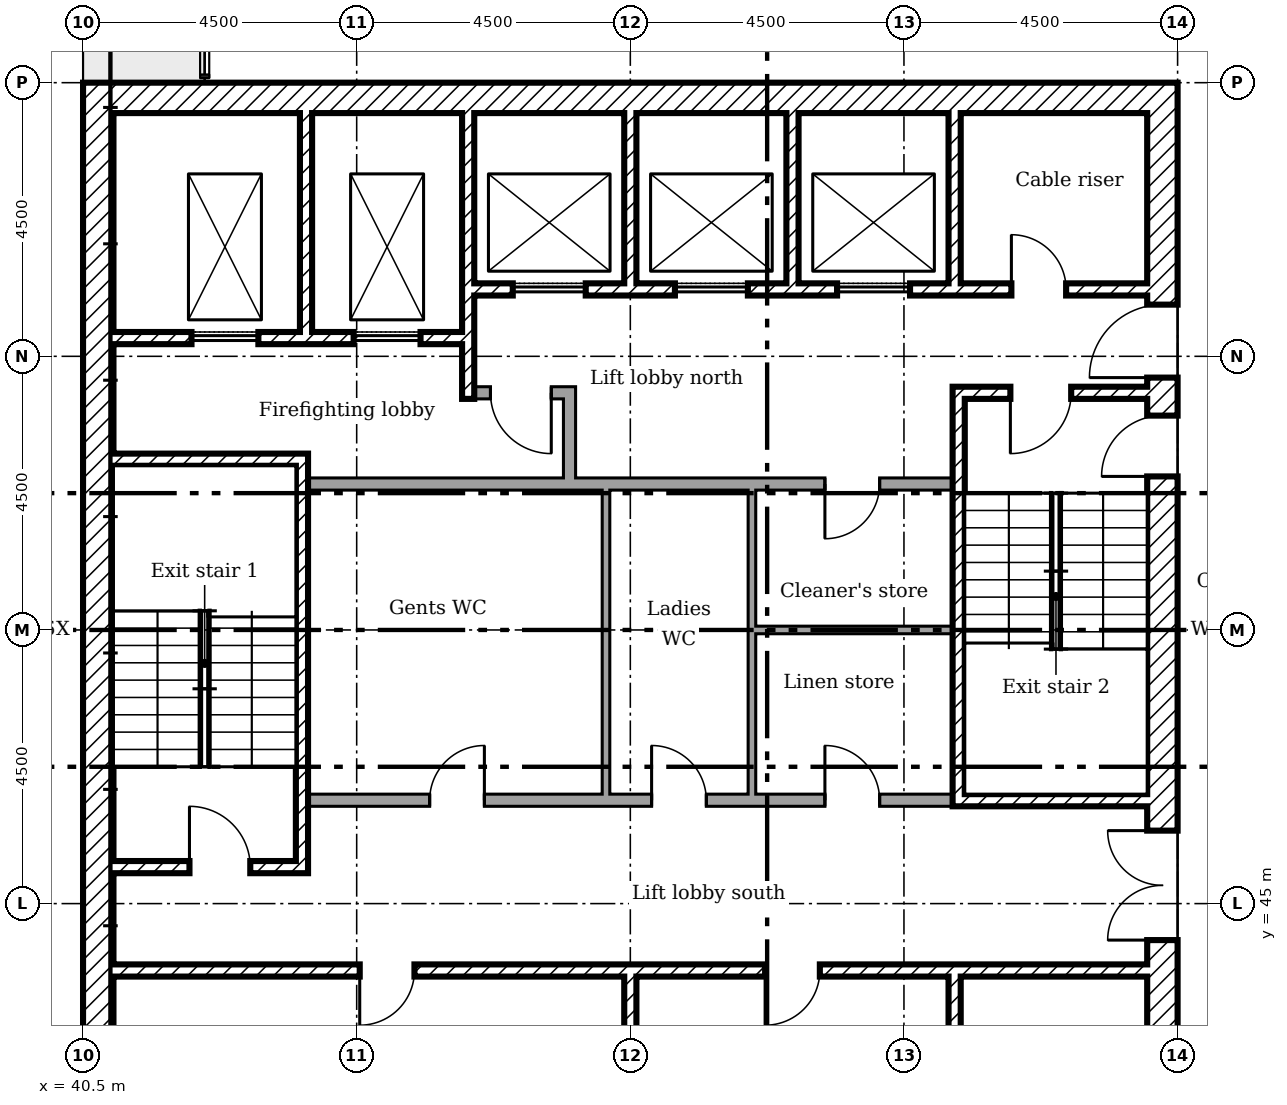
"""IFC4 building model, lengths in metres.
Left out: names, types, materials, properties, quantities, classifications, styles, units other than length and angle.
Written with IfcOpenShell. Run it as: python <this file> out.ifc"""

import sys

from ifc_helpers import new_model, si_unit, direction, frame, frame_2d, origin, place, context, subcontext, project, spatial, rectangle, extrude, element, fill, save


model = new_model("IFC4")
c1 = context("Model", 3, precision=1e-05, world=origin(), true_north=direction((0.0, 1.0)))
c2 = subcontext(c1, "Body", "Model", "MODEL_VIEW")
j1 = project(units=[si_unit("LENGTHUNIT", "METRE"), si_unit("PLANEANGLEUNIT", "RADIAN")], contexts=[c1])
p1 = place(None, origin())
s1 = spatial("IfcSite", under=j1, at=p1, CompositionType="ELEMENT")
p2 = place(p1, origin())
s2 = spatial("IfcBuilding", under=s1, at=p2, CompositionType="ELEMENT")
p3 = place(p2, frame((0.0, 0.0, 199.2)))
s3 = spatial("IfcBuildingStorey", under=s2, at=p3, CompositionType="ELEMENT", Elevation=199.2)
p4 = place(p3, frame((58.25, 40.5, 0.0), z_axis=(0.0, 0.0, 1.0), x_axis=(0.0, 1.0, 0.0)))
e1 = element("IfcWall", 1, at=p4, inside=s3, PredefinedType="SHEAR", context=c2, shape_type="SweptSolid", body=[
    extrude(rectangle(XDim=18.0, YDim=0.5, at=frame_2d((9.0, 0.0))), origin(), (0.0, 0.0, 1.0), 3.35),
])
p5 = place(p4, frame((13.15, 0.0, 0.0)))
e2 = element("IfcOpeningElement", 2, at=p5, cuts=e1, PredefinedType="OPENING", context=c2, shape_type="SweptSolid", body=[
    extrude(rectangle(XDim=1.2, YDim=2.1, at=frame_2d((0.6, 1.05))), frame((0.0, 0.26, 0.0), z_axis=(0.0, -1.0, 0.0), x_axis=(1.0, 0.0, 0.0)), (0.0, 0.0, 1.0), 0.52),
])
p6 = place(p4, frame((3.9, 0.0, 0.0)))
e3 = element("IfcOpeningElement", 3, at=p6, cuts=e1, PredefinedType="OPENING", context=c2, shape_type="SweptSolid", body=[
    extrude(rectangle(XDim=1.8, YDim=2.1, at=frame_2d((0.9, 1.05))), frame((0.0, 0.26, 0.0), z_axis=(0.0, -1.0, 0.0), x_axis=(1.0, 0.0, 0.0)), (0.0, 0.0, 1.0), 0.52),
])
p7 = place(p4, frame((11.525, 0.0, 0.0)))
e4 = element("IfcOpeningElement", 4, at=p7, cuts=e1, PredefinedType="OPENING", context=c2, shape_type="SweptSolid", body=[
    extrude(rectangle(XDim=1.0, YDim=2.1, at=frame_2d((0.5, 1.05))), frame((0.0, 0.26, 0.0), z_axis=(0.0, -1.0, 0.0), x_axis=(1.0, 0.0, 0.0)), (0.0, 0.0, 1.0), 0.52),
])
p8 = place(p3, frame((40.5, 58.25, 0.0)))
e5 = element("IfcWall", 5, at=p8, inside=s3, PredefinedType="SHEAR", context=c2, shape_type="SweptSolid", body=[
    extrude(rectangle(XDim=17.5, YDim=0.5, at=frame_2d((8.75, 0.0))), origin(), (0.0, 0.0, 1.0), 3.35),
])
p9 = place(p3, frame((40.75, 41.0, 0.0), z_axis=(0.0, 0.0, 1.0), x_axis=(0.0, 1.0, 0.0)))
e6 = element("IfcWall", 6, at=p9, inside=s3, PredefinedType="SHEAR", context=c2, shape_type="SweptSolid", body=[
    extrude(rectangle(XDim=17.0, YDim=0.5, at=frame_2d((8.5, 0.0))), origin(), (0.0, 0.0, 1.0), 3.35),
])
p10 = place(p3, frame((44.167, 58.0, 0.0), z_axis=(0.0, 0.0, 1.0), x_axis=(0.0, -1.0, 0.0)))
e7 = element("IfcWall", 7, at=p10, inside=s3, PredefinedType="SHEAR", context=c2, shape_type="SweptSolid", body=[
    extrude(rectangle(XDim=3.6, YDim=0.2, at=frame_2d((1.8, 0.0))), origin(), (0.0, 0.0, 1.0), 3.35),
])
p11 = place(p3, frame((46.833, 58.0, 0.0), z_axis=(0.0, 0.0, 1.0), x_axis=(0.0, -1.0, 0.0)))
e8 = element("IfcWall", 8, at=p11, inside=s3, PredefinedType="SHEAR", context=c2, shape_type="SweptSolid", body=[
    extrude(rectangle(XDim=4.7, YDim=0.2, at=frame_2d((2.35, 0.0))), origin(), (0.0, 0.0, 1.0), 3.35),
])
for number, where, z_axis, x_axis in (
    (9, (49.5, 58.0, 0.0), (0.0, 0.0, 1.0), (0.0, -1.0, 0.0)),
    (10, (52.167, 58.0, 0.0), (0.0, 0.0, 1.0), (0.0, -1.0, 0.0)),
    (11, (54.833, 58.0, 0.0), (0.0, 0.0, 1.0), (0.0, -1.0, 0.0)),
    (12, (49.5, 41.0, 0.0), (0.0, 0.0, 1.0), (0.0, 1.0, 0.0)),
    (13, (54.833, 41.0, 0.0), (0.0, 0.0, 1.0), (0.0, 1.0, 0.0)),
):
    element("IfcWall", number, at=place(p3, frame(where, z_axis=z_axis, x_axis=x_axis)), inside=s3, PredefinedType="SHEAR", context=c2, shape_type="SweptSolid", body=[
        extrude(rectangle(XDim=2.8, YDim=0.2, at=frame_2d((1.4, 0.0))), origin(), (0.0, 0.0, 1.0), 3.35),
    ])
p12 = place(p3, frame((48.5, 51.9, 0.0), z_axis=(0.0, 0.0, 1.0), x_axis=(0.0, 1.0, 0.0)))
e14 = element("IfcWall", 14, at=p12, inside=s3, PredefinedType="PARTITIONING", context=c2, shape_type="SweptSolid", body=[
    extrude(rectangle(XDim=1.6, YDim=0.2, at=frame_2d((0.8, 0.0))), origin(), (0.0, 0.0, 1.0), 3.35),
])
p13 = place(p3, frame((46.933, 53.4, 0.0)))
e15 = element("IfcWall", 15, at=p13, inside=s3, PredefinedType="PARTITIONING", context=c2, shape_type="SweptSolid", body=[
    extrude(rectangle(XDim=1.467, YDim=0.2, at=frame_2d((0.733, 0.0))), origin(), (0.0, 0.0, 1.0), 3.35),
])
p14 = place(p13, frame((0.267, 0.0, 0.0)))
e16 = element("IfcOpeningElement", 16, at=p14, cuts=e15, PredefinedType="OPENING", context=c2, shape_type="SweptSolid", body=[
    extrude(rectangle(XDim=1.0, YDim=2.1, at=frame_2d((0.5, 1.05))), frame((0.0, 0.11, 0.0), z_axis=(0.0, -1.0, 0.0), x_axis=(1.0, 0.0, 0.0)), (0.0, 0.0, 1.0), 0.22),
])
p15 = place(p3, frame((46.933, 55.1, 0.0)))
e17 = element("IfcWall", 17, at=p15, inside=s3, PredefinedType="SHEAR", context=c2, shape_type="SweptSolid", body=[
    extrude(rectangle(XDim=11.067, YDim=0.2, at=frame_2d((5.533, 0.0))), origin(), (0.0, 0.0, 1.0), 3.35),
])
p16 = place(p15, frame((8.833, 0.0, 0.0)))
e18 = element("IfcOpeningElement", 18, at=p16, cuts=e17, PredefinedType="OPENING", context=c2, shape_type="SweptSolid", body=[
    extrude(rectangle(XDim=0.9, YDim=2.1, at=frame_2d((0.45, 1.05))), frame((0.0, 0.11, 0.0), z_axis=(0.0, -1.0, 0.0), x_axis=(1.0, 0.0, 0.0)), (0.0, 0.0, 1.0), 0.22),
])
p17 = place(p15, frame((0.633, 0.0, 0.0)))
e19 = element("IfcOpeningElement", 19, at=p17, cuts=e17, PredefinedType="OPENING", context=c2, shape_type="SweptSolid", body=[
    extrude(rectangle(XDim=1.2, YDim=2.1, at=frame_2d((0.6, 1.05))), frame((0.0, 0.11, 0.0), z_axis=(0.0, -1.0, 0.0), x_axis=(1.0, 0.0, 0.0)), (0.0, 0.0, 1.0), 0.22),
])
p18 = place(p15, frame((3.3, 0.0, 0.0)))
e20 = element("IfcOpeningElement", 20, at=p18, cuts=e17, PredefinedType="OPENING", context=c2, shape_type="SweptSolid", body=[
    extrude(rectangle(XDim=1.2, YDim=2.1, at=frame_2d((0.6, 1.05))), frame((0.0, 0.11, 0.0), z_axis=(0.0, -1.0, 0.0), x_axis=(1.0, 0.0, 0.0)), (0.0, 0.0, 1.0), 0.22),
])
p19 = place(p15, frame((5.967, 0.0, 0.0)))
e21 = element("IfcOpeningElement", 21, at=p19, cuts=e17, PredefinedType="OPENING", context=c2, shape_type="SweptSolid", body=[
    extrude(rectangle(XDim=1.2, YDim=2.1, at=frame_2d((0.6, 1.05))), frame((0.0, 0.11, 0.0), z_axis=(0.0, -1.0, 0.0), x_axis=(1.0, 0.0, 0.0)), (0.0, 0.0, 1.0), 0.22),
])
p20 = place(p3, frame((41.0, 54.3, 0.0)))
e22 = element("IfcWall", 22, at=p20, inside=s3, PredefinedType="SHEAR", context=c2, shape_type="SweptSolid", body=[
    extrude(rectangle(XDim=5.733, YDim=0.2, at=frame_2d((2.867, 0.0))), origin(), (0.0, 0.0, 1.0), 3.35),
])
p21 = place(p20, frame((1.283, 0.0, 0.0)))
e23 = element("IfcOpeningElement", 23, at=p21, cuts=e22, PredefinedType="OPENING", context=c2, shape_type="SweptSolid", body=[
    extrude(rectangle(XDim=1.1, YDim=2.1, at=frame_2d((0.55, 1.05))), frame((0.0, 0.11, 0.0), z_axis=(0.0, -1.0, 0.0), x_axis=(1.0, 0.0, 0.0)), (0.0, 0.0, 1.0), 0.22),
])
p22 = place(p20, frame((3.95, 0.0, 0.0)))
e24 = element("IfcOpeningElement", 24, at=p22, cuts=e22, PredefinedType="OPENING", context=c2, shape_type="SweptSolid", body=[
    extrude(rectangle(XDim=1.1, YDim=2.1, at=frame_2d((0.55, 1.05))), frame((0.0, 0.11, 0.0), z_axis=(0.0, -1.0, 0.0), x_axis=(1.0, 0.0, 0.0)), (0.0, 0.0, 1.0), 0.22),
])
p23 = place(p3, frame((41.0, 43.9, 0.0)))
e25 = element("IfcWall", 25, at=p23, inside=s3, PredefinedType="SHEAR", context=c2, shape_type="SweptSolid", body=[
    extrude(rectangle(XDim=17.0, YDim=0.2, at=frame_2d((8.5, 0.0))), origin(), (0.0, 0.0, 1.0), 3.35),
])
p24 = place(p23, frame((4.05, 0.0, 0.0)))
e26 = element("IfcOpeningElement", 26, at=p24, cuts=e25, PredefinedType="OPENING", context=c2, shape_type="SweptSolid", body=[
    extrude(rectangle(XDim=0.9, YDim=2.1, at=frame_2d((0.45, 1.05))), frame((0.0, 0.11, 0.0), z_axis=(0.0, -1.0, 0.0), x_axis=(1.0, 0.0, 0.0)), (0.0, 0.0, 1.0), 0.22),
])
p25 = place(p23, frame((10.717, 0.0, 0.0)))
e27 = element("IfcOpeningElement", 27, at=p25, cuts=e25, PredefinedType="OPENING", context=c2, shape_type="SweptSolid", body=[
    extrude(rectangle(XDim=0.9, YDim=2.1, at=frame_2d((0.45, 1.05))), frame((0.0, 0.11, 0.0), z_axis=(0.0, -1.0, 0.0), x_axis=(1.0, 0.0, 0.0)), (0.0, 0.0, 1.0), 0.22),
])
p26 = place(p3, frame((44.1, 45.5, 0.0), z_axis=(0.0, 0.0, 1.0), x_axis=(0.0, 1.0, 0.0)))
e28 = element("IfcWall", 28, at=p26, inside=s3, PredefinedType="SHEAR", context=c2, shape_type="SweptSolid", body=[
    extrude(rectangle(XDim=6.9, YDim=0.2, at=frame_2d((3.45, 0.0))), origin(), (0.0, 0.0, 1.0), 3.35),
])
p27 = place(p3, frame((41.0, 52.3, 0.0)))
e29 = element("IfcWall", 29, at=p27, inside=s3, PredefinedType="SHEAR", context=c2, shape_type="SweptSolid", body=[
    extrude(rectangle(XDim=3.0, YDim=0.2, at=frame_2d((1.5, 0.0))), origin(), (0.0, 0.0, 1.0), 3.35),
])
p28 = place(p3, frame((41.0, 45.6, 0.0)))
e30 = element("IfcWall", 30, at=p28, inside=s3, PredefinedType="SHEAR", context=c2, shape_type="SweptSolid", body=[
    extrude(rectangle(XDim=3.0, YDim=0.2, at=frame_2d((1.5, 0.0))), origin(), (0.0, 0.0, 1.0), 3.35),
])
p29 = place(p28, frame((1.25, 0.0, 0.0)))
e31 = element("IfcOpeningElement", 31, at=p29, cuts=e30, PredefinedType="OPENING", context=c2, shape_type="SweptSolid", body=[
    extrude(rectangle(XDim=1.0, YDim=2.1, at=frame_2d((0.5, 1.05))), frame((0.0, 0.11, 0.0), z_axis=(0.0, -1.0, 0.0), x_axis=(1.0, 0.0, 0.0)), (0.0, 0.0, 1.0), 0.22),
])
p30 = place(p3, frame((54.8, 53.4, 0.0)))
e32 = element("IfcWall", 32, at=p30, inside=s3, PredefinedType="SHEAR", context=c2, shape_type="SweptSolid", body=[
    extrude(rectangle(XDim=3.2, YDim=0.2, at=frame_2d((1.6, 0.0))), origin(), (0.0, 0.0, 1.0), 3.35),
])
p31 = place(p30, frame((0.95, 0.0, 0.0)))
e33 = element("IfcOpeningElement", 33, at=p31, cuts=e32, PredefinedType="OPENING", context=c2, shape_type="SweptSolid", body=[
    extrude(rectangle(XDim=1.0, YDim=2.1, at=frame_2d((0.5, 1.05))), frame((0.0, 0.11, 0.0), z_axis=(0.0, -1.0, 0.0), x_axis=(1.0, 0.0, 0.0)), (0.0, 0.0, 1.0), 0.22),
])
p32 = place(p3, frame((54.8, 46.7, 0.0)))
e34 = element("IfcWall", 34, at=p32, inside=s3, PredefinedType="SHEAR", context=c2, shape_type="SweptSolid", body=[
    extrude(rectangle(XDim=3.2, YDim=0.2, at=frame_2d((1.6, 0.0))), origin(), (0.0, 0.0, 1.0), 3.35),
])
p33 = place(p3, frame((54.9, 46.8, 0.0), z_axis=(0.0, 0.0, 1.0), x_axis=(0.0, 1.0, 0.0)))
e35 = element("IfcWall", 35, at=p33, inside=s3, PredefinedType="SHEAR", context=c2, shape_type="SweptSolid", body=[
    extrude(rectangle(XDim=6.5, YDim=0.2, at=frame_2d((3.25, 0.0))), origin(), (0.0, 0.0, 1.0), 3.35),
])
p34 = place(p3, frame((44.2, 51.9, 0.0)))
e36 = element("IfcWall", 36, at=p34, inside=s3, PredefinedType="PARTITIONING", context=c2, shape_type="SweptSolid", body=[
    extrude(rectangle(XDim=10.6, YDim=0.2, at=frame_2d((5.3, 0.0))), origin(), (0.0, 0.0, 1.0), 3.35),
])
p35 = place(p34, frame((8.5, 0.0, 0.0)))
e37 = element("IfcOpeningElement", 37, at=p35, cuts=e36, PredefinedType="OPENING", context=c2, shape_type="SweptSolid", body=[
    extrude(rectangle(XDim=0.9, YDim=2.1, at=frame_2d((0.45, 1.05))), frame((0.0, 0.11, 0.0), z_axis=(0.0, -1.0, 0.0), x_axis=(1.0, 0.0, 0.0)), (0.0, 0.0, 1.0), 0.22),
])
p36 = place(p3, frame((44.2, 46.7, 0.0)))
e38 = element("IfcWall", 38, at=p36, inside=s3, PredefinedType="PARTITIONING", context=c2, shape_type="SweptSolid", body=[
    extrude(rectangle(XDim=10.6, YDim=0.2, at=frame_2d((5.3, 0.0))), origin(), (0.0, 0.0, 1.0), 3.35),
])
p37 = place(p36, frame((2.0, 0.0, 0.0)))
e39 = element("IfcOpeningElement", 39, at=p37, cuts=e38, PredefinedType="OPENING", context=c2, shape_type="SweptSolid", body=[
    extrude(rectangle(XDim=0.9, YDim=2.1, at=frame_2d((0.45, 1.05))), frame((0.0, 0.11, 0.0), z_axis=(0.0, -1.0, 0.0), x_axis=(1.0, 0.0, 0.0)), (0.0, 0.0, 1.0), 0.22),
])
p38 = place(p36, frame((5.65, 0.0, 0.0)))
e40 = element("IfcOpeningElement", 40, at=p38, cuts=e38, PredefinedType="OPENING", context=c2, shape_type="SweptSolid", body=[
    extrude(rectangle(XDim=0.9, YDim=2.1, at=frame_2d((0.45, 1.05))), frame((0.0, 0.11, 0.0), z_axis=(0.0, -1.0, 0.0), x_axis=(1.0, 0.0, 0.0)), (0.0, 0.0, 1.0), 0.22),
])
p39 = place(p36, frame((8.5, 0.0, 0.0)))
e41 = element("IfcOpeningElement", 41, at=p39, cuts=e38, PredefinedType="OPENING", context=c2, shape_type="SweptSolid", body=[
    extrude(rectangle(XDim=0.9, YDim=2.1, at=frame_2d((0.45, 1.05))), frame((0.0, 0.11, 0.0), z_axis=(0.0, -1.0, 0.0), x_axis=(1.0, 0.0, 0.0)), (0.0, 0.0, 1.0), 0.22),
])
p40 = place(p3, frame((49.1, 46.8, 0.0), z_axis=(0.0, 0.0, 1.0), x_axis=(0.0, 1.0, 0.0)))
e42 = element("IfcWall", 42, at=p40, inside=s3, PredefinedType="PARTITIONING", context=c2, shape_type="SweptSolid", body=[
    extrude(rectangle(XDim=5.0, YDim=0.125, at=frame_2d((2.5, 0.0))), origin(), (0.0, 0.0, 1.0), 3.35),
])
p41 = place(p3, frame((51.5, 46.8, 0.0), z_axis=(0.0, 0.0, 1.0), x_axis=(0.0, 1.0, 0.0)))
e43 = element("IfcWall", 43, at=p41, inside=s3, PredefinedType="PARTITIONING", context=c2, shape_type="SweptSolid", body=[
    extrude(rectangle(XDim=2.762, YDim=0.125, at=frame_2d((1.381, 0.0))), origin(), (0.0, 0.0, 1.0), 3.35),
])
p42 = place(p3, frame((51.562, 49.5, 0.0)))
e44 = element("IfcWall", 44, at=p42, inside=s3, PredefinedType="PARTITIONING", context=c2, shape_type="SweptSolid", body=[
    extrude(rectangle(XDim=3.238, YDim=0.125, at=frame_2d((1.619, 0.0))), origin(), (0.0, 0.0, 1.0), 3.35),
])
p43 = place(p3, frame((51.5, 49.5, 0.0), z_axis=(0.0, 0.0, 1.0), x_axis=(0.0, 1.0, 0.0)))
e45 = element("IfcWall", 45, at=p43, inside=s3, PredefinedType="PARTITIONING", context=c2, shape_type="SweptSolid", body=[
    extrude(rectangle(XDim=2.3, YDim=0.125, at=frame_2d((1.15, 0.0))), origin(), (0.0, 0.0, 1.0), 3.35),
])
p44 = place(p5, origin())
e46 = element("IfcDoor", 46, at=p44, inside=s3, OperationType="SINGLE_SWING_RIGHT", PredefinedType="DOOR", context=c2, shape_type="SweptSolid", body=[
    extrude(rectangle(XDim=1.2, YDim=2.1, at=frame_2d((0.6, 1.05))), frame((0.0, 0.025, 0.0), z_axis=(0.0, -1.0, 0.0), x_axis=(1.0, 0.0, 0.0)), (0.0, 0.0, 1.0), 0.05),
])
fill(e2, e46)
p45 = place(p6, origin())
e47 = element("IfcDoor", 47, at=p45, inside=s3, OperationType="DOUBLE_DOOR_SINGLE_SWING", PredefinedType="DOOR", context=c2, shape_type="SweptSolid", body=[
    extrude(rectangle(XDim=1.8, YDim=2.1, at=frame_2d((0.9, 1.05))), frame((0.0, 0.025, 0.0), z_axis=(0.0, -1.0, 0.0), x_axis=(1.0, 0.0, 0.0)), (0.0, 0.0, 1.0), 0.05),
])
fill(e3, e47)
p46 = place(p29, origin())
e48 = element("IfcDoor", 48, at=p46, inside=s3, OperationType="SINGLE_SWING_RIGHT", PredefinedType="DOOR", context=c2, shape_type="SweptSolid", body=[
    extrude(rectangle(XDim=1.0, YDim=2.1, at=frame_2d((0.5, 1.05))), frame((0.0, 0.025, 0.0), z_axis=(0.0, -1.0, 0.0), x_axis=(1.0, 0.0, 0.0)), (0.0, 0.0, 1.0), 0.05),
])
fill(e31, e48)
p47 = place(p31, frame((1.0, 0.0, 0.0), x_axis=(-1.0, 0.0, 0.0)))
e49 = element("IfcDoor", 49, at=p47, inside=s3, OperationType="SINGLE_SWING_LEFT", PredefinedType="DOOR", context=c2, shape_type="SweptSolid", body=[
    extrude(rectangle(XDim=1.0, YDim=2.1, at=frame_2d((0.5, 1.05))), frame((0.0, 0.025, 0.0), z_axis=(0.0, -1.0, 0.0), x_axis=(1.0, 0.0, 0.0)), (0.0, 0.0, 1.0), 0.05),
])
fill(e33, e49)
p48 = place(p7, origin())
e50 = element("IfcDoor", 50, at=p48, inside=s3, OperationType="SINGLE_SWING_RIGHT", PredefinedType="DOOR", context=c2, shape_type="SweptSolid", body=[
    extrude(rectangle(XDim=1.0, YDim=2.1, at=frame_2d((0.5, 1.05))), frame((0.0, 0.025, 0.0), z_axis=(0.0, -1.0, 0.0), x_axis=(1.0, 0.0, 0.0)), (0.0, 0.0, 1.0), 0.05),
])
fill(e4, e50)
p49 = place(p14, frame((1.0, 0.0, 0.0), x_axis=(-1.0, 0.0, 0.0)))
e51 = element("IfcDoor", 51, at=p49, inside=s3, OperationType="SINGLE_SWING_RIGHT", PredefinedType="DOOR", context=c2, shape_type="SweptSolid", body=[
    extrude(rectangle(XDim=1.0, YDim=2.1, at=frame_2d((0.5, 1.05))), frame((0.0, 0.025, 0.0), z_axis=(0.0, -1.0, 0.0), x_axis=(1.0, 0.0, 0.0)), (0.0, 0.0, 1.0), 0.05),
])
fill(e16, e51)
p50 = place(p16, origin())
e52 = element("IfcDoor", 52, at=p50, inside=s3, OperationType="SINGLE_SWING_RIGHT", PredefinedType="DOOR", context=c2, shape_type="SweptSolid", body=[
    extrude(rectangle(XDim=0.9, YDim=2.1, at=frame_2d((0.45, 1.05))), frame((0.0, 0.025, 0.0), z_axis=(0.0, -1.0, 0.0), x_axis=(1.0, 0.0, 0.0)), (0.0, 0.0, 1.0), 0.05),
])
fill(e18, e52)
p51 = place(p24, frame((0.9, 0.0, 0.0), x_axis=(-1.0, 0.0, 0.0)))
e53 = element("IfcDoor", 53, at=p51, inside=s3, OperationType="SINGLE_SWING_LEFT", PredefinedType="DOOR", context=c2, shape_type="SweptSolid", body=[
    extrude(rectangle(XDim=0.9, YDim=2.1, at=frame_2d((0.45, 1.05))), frame((0.0, 0.025, 0.0), z_axis=(0.0, -1.0, 0.0), x_axis=(1.0, 0.0, 0.0)), (0.0, 0.0, 1.0), 0.05),
])
fill(e26, e53)
p52 = place(p25, frame((0.9, 0.0, 0.0), x_axis=(-1.0, 0.0, 0.0)))
e54 = element("IfcDoor", 54, at=p52, inside=s3, OperationType="SINGLE_SWING_LEFT", PredefinedType="DOOR", context=c2, shape_type="SweptSolid", body=[
    extrude(rectangle(XDim=0.9, YDim=2.1, at=frame_2d((0.45, 1.05))), frame((0.0, 0.025, 0.0), z_axis=(0.0, -1.0, 0.0), x_axis=(1.0, 0.0, 0.0)), (0.0, 0.0, 1.0), 0.05),
])
fill(e27, e54)
p53 = place(p37, origin())
e55 = element("IfcDoor", 55, at=p53, inside=s3, OperationType="SINGLE_SWING_LEFT", PredefinedType="DOOR", context=c2, shape_type="SweptSolid", body=[
    extrude(rectangle(XDim=0.9, YDim=2.1, at=frame_2d((0.45, 1.05))), frame((0.0, 0.025, 0.0), z_axis=(0.0, -1.0, 0.0), x_axis=(1.0, 0.0, 0.0)), (0.0, 0.0, 1.0), 0.05),
])
fill(e39, e55)
p54 = place(p38, origin())
e56 = element("IfcDoor", 56, at=p54, inside=s3, OperationType="SINGLE_SWING_RIGHT", PredefinedType="DOOR", context=c2, shape_type="SweptSolid", body=[
    extrude(rectangle(XDim=0.9, YDim=2.1, at=frame_2d((0.45, 1.05))), frame((0.0, 0.025, 0.0), z_axis=(0.0, -1.0, 0.0), x_axis=(1.0, 0.0, 0.0)), (0.0, 0.0, 1.0), 0.05),
])
fill(e40, e56)
p55 = place(p35, frame((0.9, 0.0, 0.0), x_axis=(-1.0, 0.0, 0.0)))
e57 = element("IfcDoor", 57, at=p55, inside=s3, OperationType="SINGLE_SWING_LEFT", PredefinedType="DOOR", context=c2, shape_type="SweptSolid", body=[
    extrude(rectangle(XDim=0.9, YDim=2.1, at=frame_2d((0.45, 1.05))), frame((0.0, 0.025, 0.0), z_axis=(0.0, -1.0, 0.0), x_axis=(1.0, 0.0, 0.0)), (0.0, 0.0, 1.0), 0.05),
])
fill(e37, e57)
p56 = place(p39, origin())
e58 = element("IfcDoor", 58, at=p56, inside=s3, OperationType="SINGLE_SWING_RIGHT", PredefinedType="DOOR", context=c2, shape_type="SweptSolid", body=[
    extrude(rectangle(XDim=0.9, YDim=2.1, at=frame_2d((0.45, 1.05))), frame((0.0, 0.025, 0.0), z_axis=(0.0, -1.0, 0.0), x_axis=(1.0, 0.0, 0.0)), (0.0, 0.0, 1.0), 0.05),
])
fill(e41, e58)
p57 = place(p21, origin())
e59 = element("IfcDoor", 59, at=p57, inside=s3, OperationType="SLIDING_TO_LEFT", PredefinedType="DOOR", context=c2, shape_type="SweptSolid", body=[
    extrude(rectangle(XDim=1.1, YDim=2.1, at=frame_2d((0.55, 1.05))), frame((0.0, 0.025, 0.0), z_axis=(0.0, -1.0, 0.0), x_axis=(1.0, 0.0, 0.0)), (0.0, 0.0, 1.0), 0.05),
])
fill(e23, e59)
p58 = place(p22, origin())
e60 = element("IfcDoor", 60, at=p58, inside=s3, OperationType="SLIDING_TO_LEFT", PredefinedType="DOOR", context=c2, shape_type="SweptSolid", body=[
    extrude(rectangle(XDim=1.1, YDim=2.1, at=frame_2d((0.55, 1.05))), frame((0.0, 0.025, 0.0), z_axis=(0.0, -1.0, 0.0), x_axis=(1.0, 0.0, 0.0)), (0.0, 0.0, 1.0), 0.05),
])
fill(e24, e60)
p59 = place(p17, origin())
e61 = element("IfcDoor", 61, at=p59, inside=s3, OperationType="SLIDING_TO_LEFT", PredefinedType="DOOR", context=c2, shape_type="SweptSolid", body=[
    extrude(rectangle(XDim=1.2, YDim=2.1, at=frame_2d((0.6, 1.05))), frame((0.0, 0.025, 0.0), z_axis=(0.0, -1.0, 0.0), x_axis=(1.0, 0.0, 0.0)), (0.0, 0.0, 1.0), 0.05),
])
fill(e19, e61)
p60 = place(p18, origin())
e62 = element("IfcDoor", 62, at=p60, inside=s3, OperationType="SLIDING_TO_LEFT", PredefinedType="DOOR", context=c2, shape_type="SweptSolid", body=[
    extrude(rectangle(XDim=1.2, YDim=2.1, at=frame_2d((0.6, 1.05))), frame((0.0, 0.025, 0.0), z_axis=(0.0, -1.0, 0.0), x_axis=(1.0, 0.0, 0.0)), (0.0, 0.0, 1.0), 0.05),
])
fill(e20, e62)
p61 = place(p19, origin())
e63 = element("IfcDoor", 63, at=p61, inside=s3, OperationType="SLIDING_TO_LEFT", PredefinedType="DOOR", context=c2, shape_type="SweptSolid", body=[
    extrude(rectangle(XDim=1.2, YDim=2.1, at=frame_2d((0.6, 1.05))), frame((0.0, 0.025, 0.0), z_axis=(0.0, -1.0, 0.0), x_axis=(1.0, 0.0, 0.0)), (0.0, 0.0, 1.0), 0.05),
])
fill(e21, e63)
save(model, sys.argv[1])
